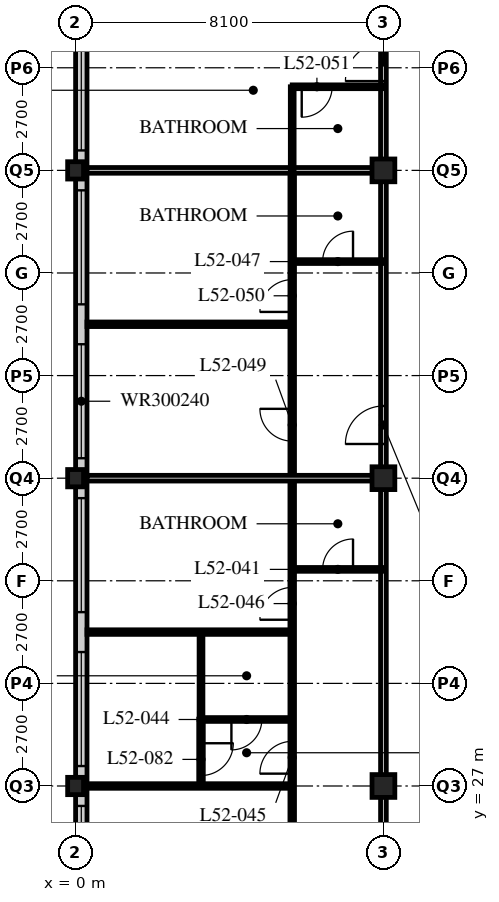
"""IFC4 building model, lengths in metres.
Left out: names, types, materials, properties, quantities, classifications, styles, units other than length and angle.
Written with IfcOpenShell. Run it as: python <this file> out.ifc"""

import sys

from ifc_helpers import new_model, si_unit, direction, frame, frame_2d, origin, origin_2d, place, context, subcontext, project, spatial, rectangle, hollow_rectangle, i_section, extrude, element, fill, save


model = new_model("IFC4")
c1 = context("Model", 3, precision=1e-05, world=origin(), true_north=direction((0.0, 1.0)))
c2 = subcontext(c1, "Body", "Model", "MODEL_VIEW")
j1 = project(units=[si_unit("LENGTHUNIT", "METRE"), si_unit("PLANEANGLEUNIT", "RADIAN")], contexts=[c1])
p1 = place(None, origin())
s1 = spatial("IfcSite", under=j1, at=p1, CompositionType="ELEMENT")
p2 = place(p1, origin())
s2 = spatial("IfcBuilding", under=s1, at=p2, CompositionType="ELEMENT")
p3 = place(p2, frame((0.0, 0.0, 202.8)))
s3 = spatial("IfcBuildingStorey", under=s2, at=p3, CompositionType="ELEMENT", Elevation=202.8)
for number, where, z_axis, x_axis in (
    (1, (0.0, 27.0, 0.0), (0.0, 0.0, 1.0), (1.0, 0.0, 0.0)),
    (2, (0.0, 35.1, 0.0), (0.0, 0.0, 1.0), (1.0, 0.0, 0.0)),
    (3, (0.0, 43.2, 0.0), (0.0, 0.0, 1.0), (1.0, 0.0, 0.0)),
):
    element("IfcColumn", number, at=place(p3, frame(where, z_axis=z_axis, x_axis=x_axis)), inside=s3, PredefinedType="COLUMN", context=c2, shape_type="SweptSolid", body=[
        extrude(i_section(OverallWidth=0.418, OverallDepth=0.456, WebThickness=0.042, FlangeThickness=0.067, FilletRadius=0.015, at=origin_2d()), origin(), (0.0, 0.0, 1.0), 3.6),
    ])
for number, where, z_axis, x_axis in (
    (4, (8.1, 27.0, 0.0), (0.0, 0.0, 1.0), (1.0, 0.0, 0.0)),
    (5, (8.1, 35.1, 0.0), (0.0, 0.0, 1.0), (1.0, 0.0, 0.0)),
    (6, (8.1, 43.2, 0.0), (0.0, 0.0, 1.0), (1.0, 0.0, 0.0)),
):
    element("IfcColumn", number, at=place(p3, frame(where, z_axis=z_axis, x_axis=x_axis)), inside=s3, PredefinedType="COLUMN", context=c2, shape_type="SweptSolid", body=[
        extrude(hollow_rectangle(XDim=0.6, YDim=0.6, WallThickness=0.05, at=origin_2d()), origin(), (0.0, 0.0, 1.0), 3.6),
    ])
p4 = place(p3, frame((0.15, 51.0, 0.0), z_axis=(0.0, 0.0, 1.0), x_axis=(0.0, -1.0, 0.0)))
e7 = element("IfcWall", 7, at=p4, inside=s3, PredefinedType="SOLIDWALL", context=c2, shape_type="SweptSolid", body=[
    extrude(rectangle(XDim=32.1, YDim=0.3, at=frame_2d((16.05, 0.0))), origin(), (0.0, 0.0, 1.0), 3.39),
])
p5 = place(p4, frame((0.225, 0.0, 0.6)))
e8 = element("IfcOpeningElement", 8, at=p5, cuts=e7, PredefinedType="OPENING", context=c2, shape_type="SweptSolid", body=[
    extrude(rectangle(XDim=3.0, YDim=2.4, at=frame_2d((1.5, 1.2))), frame((0.0, 0.16, 0.0), z_axis=(0.0, -1.0, 0.0), x_axis=(1.0, 0.0, 0.0)), (0.0, 0.0, 1.0), 0.32),
])
p6 = place(p4, frame((4.275, 0.0, 0.6)))
e9 = element("IfcOpeningElement", 9, at=p6, cuts=e7, PredefinedType="OPENING", context=c2, shape_type="SweptSolid", body=[
    extrude(rectangle(XDim=3.0, YDim=2.4, at=frame_2d((1.5, 1.2))), frame((0.0, 0.16, 0.0), z_axis=(0.0, -1.0, 0.0), x_axis=(1.0, 0.0, 0.0)), (0.0, 0.0, 1.0), 0.32),
])
p7 = place(p4, frame((8.325, 0.0, 0.6)))
e10 = element("IfcOpeningElement", 10, at=p7, cuts=e7, PredefinedType="OPENING", context=c2, shape_type="SweptSolid", body=[
    extrude(rectangle(XDim=3.0, YDim=2.4, at=frame_2d((1.5, 1.2))), frame((0.0, 0.16, 0.0), z_axis=(0.0, -1.0, 0.0), x_axis=(1.0, 0.0, 0.0)), (0.0, 0.0, 1.0), 0.32),
])
p8 = place(p4, frame((12.375, 0.0, 0.6)))
e11 = element("IfcOpeningElement", 11, at=p8, cuts=e7, PredefinedType="OPENING", context=c2, shape_type="SweptSolid", body=[
    extrude(rectangle(XDim=3.0, YDim=2.4, at=frame_2d((1.5, 1.2))), frame((0.0, 0.16, 0.0), z_axis=(0.0, -1.0, 0.0), x_axis=(1.0, 0.0, 0.0)), (0.0, 0.0, 1.0), 0.32),
])
p9 = place(p4, frame((16.425, 0.0, 0.6)))
e12 = element("IfcOpeningElement", 12, at=p9, cuts=e7, PredefinedType="OPENING", context=c2, shape_type="SweptSolid", body=[
    extrude(rectangle(XDim=3.0, YDim=2.4, at=frame_2d((1.5, 1.2))), frame((0.0, 0.16, 0.0), z_axis=(0.0, -1.0, 0.0), x_axis=(1.0, 0.0, 0.0)), (0.0, 0.0, 1.0), 0.32),
])
p10 = place(p4, frame((20.475, 0.0, 0.6)))
e13 = element("IfcOpeningElement", 13, at=p10, cuts=e7, PredefinedType="OPENING", context=c2, shape_type="SweptSolid", body=[
    extrude(rectangle(XDim=3.0, YDim=2.4, at=frame_2d((1.5, 1.2))), frame((0.0, 0.16, 0.0), z_axis=(0.0, -1.0, 0.0), x_axis=(1.0, 0.0, 0.0)), (0.0, 0.0, 1.0), 0.32),
])
p11 = place(p4, frame((24.525, 0.0, 0.6)))
e14 = element("IfcOpeningElement", 14, at=p11, cuts=e7, PredefinedType="OPENING", context=c2, shape_type="SweptSolid", body=[
    extrude(rectangle(XDim=3.0, YDim=2.4, at=frame_2d((1.5, 1.2))), frame((0.0, 0.16, 0.0), z_axis=(0.0, -1.0, 0.0), x_axis=(1.0, 0.0, 0.0)), (0.0, 0.0, 1.0), 0.32),
])
p12 = place(p4, frame((28.575, 0.0, 0.6)))
e15 = element("IfcOpeningElement", 15, at=p12, cuts=e7, PredefinedType="OPENING", context=c2, shape_type="SweptSolid", body=[
    extrude(rectangle(XDim=3.0, YDim=2.4, at=frame_2d((1.5, 1.2))), frame((0.0, 0.16, 0.0), z_axis=(0.0, -1.0, 0.0), x_axis=(1.0, 0.0, 0.0)), (0.0, 0.0, 1.0), 0.32),
])
p13 = place(p3, frame((8.1, 18.9, 0.0), z_axis=(0.0, 0.0, 1.0), x_axis=(0.0, 1.0, 0.0)))
e16 = element("IfcWall", 16, at=p13, inside=s3, PredefinedType="PARTITIONING", context=c2, shape_type="SweptSolid", body=[
    extrude(rectangle(XDim=28.35, YDim=0.15, at=frame_2d((14.175, 0.0))), origin(), (0.0, 0.0, 1.0), 2.778),
])
p14 = place(p13, frame((0.9, 0.0, 0.0)))
e17 = element("IfcOpeningElement", 17, at=p14, cuts=e16, PredefinedType="OPENING", context=c2, shape_type="SweptSolid", body=[
    extrude(rectangle(XDim=1.0, YDim=2.1, at=frame_2d((0.5, 1.05))), frame((0.0, 0.085, 0.0), z_axis=(0.0, -1.0, 0.0), x_axis=(1.0, 0.0, 0.0)), (0.0, 0.0, 1.0), 0.17),
])
p15 = place(p13, frame((17.1, 0.0, 0.0)))
e18 = element("IfcOpeningElement", 18, at=p15, cuts=e16, PredefinedType="OPENING", context=c2, shape_type="SweptSolid", body=[
    extrude(rectangle(XDim=1.0, YDim=2.1, at=frame_2d((0.5, 1.05))), frame((0.0, 0.085, 0.0), z_axis=(0.0, -1.0, 0.0), x_axis=(1.0, 0.0, 0.0)), (0.0, 0.0, 1.0), 0.17),
])
p16 = place(p13, frame((26.65, 0.0, 0.0)))
e19 = element("IfcOpeningElement", 19, at=p16, cuts=e16, PredefinedType="OPENING", context=c2, shape_type="SweptSolid", body=[
    extrude(rectangle(XDim=1.0, YDim=2.1, at=frame_2d((0.5, 1.05))), frame((0.0, 0.085, 0.0), z_axis=(0.0, -1.0, 0.0), x_axis=(1.0, 0.0, 0.0)), (0.0, 0.0, 1.0), 0.17),
])
p17 = place(p3, frame((5.7, 18.9, 0.0), z_axis=(0.0, 0.0, 1.0), x_axis=(0.0, 1.0, 0.0)))
e20 = element("IfcWall", 20, at=p17, inside=s3, PredefinedType="PARTITIONING", context=c2, shape_type="SweptSolid", body=[
    extrude(rectangle(XDim=24.3, YDim=0.12, at=frame_2d((12.15, 0.0))), origin(), (0.0, 0.0, 1.0), 3.39),
])
p18 = place(p17, frame((0.975, 0.0, 0.0)))
e21 = element("IfcOpeningElement", 21, at=p18, cuts=e20, PredefinedType="OPENING", context=c2, shape_type="SweptSolid", body=[
    extrude(rectangle(XDim=0.85, YDim=2.1, at=frame_2d((0.425, 1.05))), frame((0.0, 0.07, 0.0), z_axis=(0.0, -1.0, 0.0), x_axis=(1.0, 0.0, 0.0)), (0.0, 0.0, 1.0), 0.14),
])
p19 = place(p17, frame((8.425, 0.0, 0.0)))
e22 = element("IfcOpeningElement", 22, at=p19, cuts=e20, PredefinedType="OPENING", context=c2, shape_type="SweptSolid", body=[
    extrude(rectangle(XDim=0.85, YDim=2.1, at=frame_2d((0.425, 1.05))), frame((0.0, 0.07, 0.0), z_axis=(0.0, -1.0, 0.0), x_axis=(1.0, 0.0, 0.0)), (0.0, 0.0, 1.0), 0.14),
])
p20 = place(p17, frame((12.475, 0.0, 0.0)))
e23 = element("IfcOpeningElement", 23, at=p20, cuts=e20, PredefinedType="OPENING", context=c2, shape_type="SweptSolid", body=[
    extrude(rectangle(XDim=0.85, YDim=2.1, at=frame_2d((0.425, 1.05))), frame((0.0, 0.07, 0.0), z_axis=(0.0, -1.0, 0.0), x_axis=(1.0, 0.0, 0.0)), (0.0, 0.0, 1.0), 0.14),
])
p21 = place(p17, frame((17.175, 0.0, 0.0)))
e24 = element("IfcOpeningElement", 24, at=p21, cuts=e20, PredefinedType="OPENING", context=c2, shape_type="SweptSolid", body=[
    extrude(rectangle(XDim=0.85, YDim=2.1, at=frame_2d((0.425, 1.05))), frame((0.0, 0.07, 0.0), z_axis=(0.0, -1.0, 0.0), x_axis=(1.0, 0.0, 0.0)), (0.0, 0.0, 1.0), 0.14),
])
p22 = place(p17, frame((20.575, 0.0, 0.0)))
e25 = element("IfcOpeningElement", 25, at=p22, cuts=e20, PredefinedType="OPENING", context=c2, shape_type="SweptSolid", body=[
    extrude(rectangle(XDim=0.85, YDim=2.1, at=frame_2d((0.425, 1.05))), frame((0.0, 0.07, 0.0), z_axis=(0.0, -1.0, 0.0), x_axis=(1.0, 0.0, 0.0)), (0.0, 0.0, 1.0), 0.14),
])
p23 = place(p3, frame((8.1, 32.7, 0.0), z_axis=(0.0, 0.0, 1.0), x_axis=(-1.0, 0.0, 0.0)))
e26 = element("IfcWall", 26, at=p23, inside=s3, PredefinedType="PARTITIONING", context=c2, shape_type="SweptSolid", body=[
    extrude(rectangle(XDim=2.4, YDim=0.1, at=frame_2d((1.2, 0.0))), origin(), (0.0, 0.0, 1.0), 3.39),
])
p24 = place(p23, frame((0.8, 0.0, 0.0)))
e27 = element("IfcOpeningElement", 27, at=p24, cuts=e26, PredefinedType="OPENING", context=c2, shape_type="SweptSolid", body=[
    extrude(rectangle(XDim=0.8, YDim=2.1, at=frame_2d((0.4, 1.05))), frame((0.0, 0.06, 0.0), z_axis=(0.0, -1.0, 0.0), x_axis=(1.0, 0.0, 0.0)), (0.0, 0.0, 1.0), 0.12),
])
p25 = place(p3, frame((5.7, 28.75, 0.0), z_axis=(0.0, 0.0, 1.0), x_axis=(-1.0, 0.0, 0.0)))
e28 = element("IfcWall", 28, at=p25, inside=s3, PredefinedType="PARTITIONING", context=c2, shape_type="SweptSolid", body=[
    extrude(rectangle(XDim=2.4, YDim=0.1, at=frame_2d((1.2, 0.0))), origin(), (0.0, 0.0, 1.0), 3.39),
])
p26 = place(p25, frame((0.8, 0.0, 0.0)))
e29 = element("IfcOpeningElement", 29, at=p26, cuts=e28, PredefinedType="OPENING", context=c2, shape_type="SweptSolid", body=[
    extrude(rectangle(XDim=0.8, YDim=2.1, at=frame_2d((0.4, 1.05))), frame((0.0, 0.06, 0.0), z_axis=(0.0, -1.0, 0.0), x_axis=(1.0, 0.0, 0.0)), (0.0, 0.0, 1.0), 0.12),
])
p27 = place(p3, frame((3.3, 28.75, 0.0), z_axis=(0.0, 0.0, 1.0), x_axis=(0.0, 1.0, 0.0)))
e30 = element("IfcWall", 30, at=p27, inside=s3, PredefinedType="PARTITIONING", context=c2, shape_type="SweptSolid", body=[
    extrude(rectangle(XDim=2.3, YDim=0.1, at=frame_2d((1.15, 0.0))), origin(), (0.0, 0.0, 1.0), 3.39),
])
p28 = place(p3, frame((5.7, 27.0, 0.0), z_axis=(0.0, 0.0, 1.0), x_axis=(-1.0, 0.0, 0.0)))
e31 = element("IfcWall", 31, at=p28, inside=s3, PredefinedType="PARTITIONING", context=c2, shape_type="SweptSolid", body=[
    extrude(rectangle(XDim=5.4, YDim=0.12, at=frame_2d((2.7, 0.0))), origin(), (0.0, 0.0, 1.0), 2.778),
])
p29 = place(p3, frame((5.7, 31.05, 0.0), z_axis=(0.0, 0.0, 1.0), x_axis=(-1.0, 0.0, 0.0)))
e32 = element("IfcWall", 32, at=p29, inside=s3, PredefinedType="PARTITIONING", context=c2, shape_type="SweptSolid", body=[
    extrude(rectangle(XDim=5.4, YDim=0.12, at=frame_2d((2.7, 0.0))), origin(), (0.0, 0.0, 1.0), 3.39),
])
p30 = place(p3, frame((8.1, 35.1, 0.0), z_axis=(0.0, 0.0, 1.0), x_axis=(-1.0, 0.0, 0.0)))
e33 = element("IfcWall", 33, at=p30, inside=s3, PredefinedType="PARTITIONING", context=c2, shape_type="SweptSolid", body=[
    extrude(rectangle(XDim=7.8, YDim=0.15, at=frame_2d((3.9, 0.0))), origin(), (0.0, 0.0, 1.0), 2.778),
])
p31 = place(p3, frame((8.1, 40.8, 0.0), z_axis=(0.0, 0.0, 1.0), x_axis=(-1.0, 0.0, 0.0)))
e34 = element("IfcWall", 34, at=p31, inside=s3, PredefinedType="PARTITIONING", context=c2, shape_type="SweptSolid", body=[
    extrude(rectangle(XDim=2.4, YDim=0.1, at=frame_2d((1.2, 0.0))), origin(), (0.0, 0.0, 1.0), 3.39),
])
p32 = place(p31, frame((0.8, 0.0, 0.0)))
e35 = element("IfcOpeningElement", 35, at=p32, cuts=e34, PredefinedType="OPENING", context=c2, shape_type="SweptSolid", body=[
    extrude(rectangle(XDim=0.8, YDim=2.1, at=frame_2d((0.4, 1.05))), frame((0.0, 0.06, 0.0), z_axis=(0.0, -1.0, 0.0), x_axis=(1.0, 0.0, 0.0)), (0.0, 0.0, 1.0), 0.12),
])
p33 = place(p3, frame((5.7, 39.15, 0.0), z_axis=(0.0, 0.0, 1.0), x_axis=(-1.0, 0.0, 0.0)))
e36 = element("IfcWall", 36, at=p33, inside=s3, PredefinedType="PARTITIONING", context=c2, shape_type="SweptSolid", body=[
    extrude(rectangle(XDim=5.4, YDim=0.12, at=frame_2d((2.7, 0.0))), origin(), (0.0, 0.0, 1.0), 3.39),
])
p34 = place(p3, frame((8.1, 43.2, 0.0), z_axis=(0.0, 0.0, 1.0), x_axis=(-1.0, 0.0, 0.0)))
e37 = element("IfcWall", 37, at=p34, inside=s3, PredefinedType="PARTITIONING", context=c2, shape_type="SweptSolid", body=[
    extrude(rectangle(XDim=7.8, YDim=0.15, at=frame_2d((3.9, 0.0))), origin(), (0.0, 0.0, 1.0), 2.778),
])
p35 = place(p3, frame((5.7, 43.2, 0.0), z_axis=(0.0, 0.0, 1.0), x_axis=(0.0, 1.0, 0.0)))
e38 = element("IfcWall", 38, at=p35, inside=s3, PredefinedType="PARTITIONING", context=c2, shape_type="SweptSolid", body=[
    extrude(rectangle(XDim=2.2, YDim=0.1, at=frame_2d((1.1, 0.0))), origin(), (0.0, 0.0, 1.0), 3.39),
])
p36 = place(p3, frame((8.1, 45.4, 0.0), z_axis=(0.0, 0.0, 1.0), x_axis=(-1.0, 0.0, 0.0)))
e39 = element("IfcWall", 39, at=p36, inside=s3, PredefinedType="PARTITIONING", context=c2, shape_type="SweptSolid", body=[
    extrude(rectangle(XDim=2.4, YDim=0.1, at=frame_2d((1.2, 0.0))), origin(), (0.0, 0.0, 1.0), 3.39),
])
p37 = place(p36, frame((1.35, 0.0, 0.0)))
e40 = element("IfcOpeningElement", 40, at=p37, cuts=e39, PredefinedType="OPENING", context=c2, shape_type="SweptSolid", body=[
    extrude(rectangle(XDim=0.8, YDim=2.1, at=frame_2d((0.4, 1.05))), frame((0.0, 0.06, 0.0), z_axis=(0.0, -1.0, 0.0), x_axis=(1.0, 0.0, 0.0)), (0.0, 0.0, 1.0), 0.12),
])
p38 = place(p3, frame((3.3, 27.0, 0.0), z_axis=(0.0, 0.0, 1.0), x_axis=(0.0, 1.0, 0.0)))
e41 = element("IfcWall", 41, at=p38, inside=s3, PredefinedType="PARTITIONING", context=c2, shape_type="SweptSolid", body=[
    extrude(rectangle(XDim=1.76, YDim=0.12, at=frame_2d((0.88, 0.0))), origin(), (0.0, 0.0, 1.0), 3.39),
])
p39 = place(p38, frame((0.275, 0.0, 0.0)))
e42 = element("IfcOpeningElement", 42, at=p39, cuts=e41, PredefinedType="OPENING", context=c2, shape_type="SweptSolid", body=[
    extrude(rectangle(XDim=0.85, YDim=2.1, at=frame_2d((0.425, 1.05))), frame((0.0, 0.07, 0.0), z_axis=(0.0, -1.0, 0.0), x_axis=(1.0, 0.0, 0.0)), (0.0, 0.0, 1.0), 0.14),
])
p40 = place(p6, origin())
e43 = element("IfcWindow", 43, at=p40, inside=s3, PartitioningType="SINGLE_PANEL", PredefinedType="WINDOW", context=c2, shape_type="SweptSolid", body=[
    extrude(rectangle(XDim=3.0, YDim=2.4, at=frame_2d((1.5, 1.2))), frame((0.0, 0.03, 0.0), z_axis=(0.0, -1.0, 0.0), x_axis=(1.0, 0.0, 0.0)), (0.0, 0.0, 1.0), 0.06),
])
fill(e9, e43)
p41 = place(p7, origin())
e44 = element("IfcWindow", 44, at=p41, inside=s3, PartitioningType="SINGLE_PANEL", PredefinedType="WINDOW", context=c2, shape_type="SweptSolid", body=[
    extrude(rectangle(XDim=3.0, YDim=2.4, at=frame_2d((1.5, 1.2))), frame((0.0, 0.03, 0.0), z_axis=(0.0, -1.0, 0.0), x_axis=(1.0, 0.0, 0.0)), (0.0, 0.0, 1.0), 0.06),
])
fill(e10, e44)
p42 = place(p8, origin())
e45 = element("IfcWindow", 45, at=p42, inside=s3, PartitioningType="SINGLE_PANEL", PredefinedType="WINDOW", context=c2, shape_type="SweptSolid", body=[
    extrude(rectangle(XDim=3.0, YDim=2.4, at=frame_2d((1.5, 1.2))), frame((0.0, 0.03, 0.0), z_axis=(0.0, -1.0, 0.0), x_axis=(1.0, 0.0, 0.0)), (0.0, 0.0, 1.0), 0.06),
])
fill(e11, e45)
p43 = place(p9, origin())
e46 = element("IfcWindow", 46, at=p43, inside=s3, PartitioningType="SINGLE_PANEL", PredefinedType="WINDOW", context=c2, shape_type="SweptSolid", body=[
    extrude(rectangle(XDim=3.0, YDim=2.4, at=frame_2d((1.5, 1.2))), frame((0.0, 0.03, 0.0), z_axis=(0.0, -1.0, 0.0), x_axis=(1.0, 0.0, 0.0)), (0.0, 0.0, 1.0), 0.06),
])
fill(e12, e46)
p44 = place(p10, origin())
e47 = element("IfcWindow", 47, at=p44, inside=s3, PartitioningType="SINGLE_PANEL", PredefinedType="WINDOW", context=c2, shape_type="SweptSolid", body=[
    extrude(rectangle(XDim=3.0, YDim=2.4, at=frame_2d((1.5, 1.2))), frame((0.0, 0.03, 0.0), z_axis=(0.0, -1.0, 0.0), x_axis=(1.0, 0.0, 0.0)), (0.0, 0.0, 1.0), 0.06),
])
fill(e13, e47)
p45 = place(p11, origin())
e48 = element("IfcWindow", 48, at=p45, inside=s3, PartitioningType="SINGLE_PANEL", PredefinedType="WINDOW", context=c2, shape_type="SweptSolid", body=[
    extrude(rectangle(XDim=3.0, YDim=2.4, at=frame_2d((1.5, 1.2))), frame((0.0, 0.03, 0.0), z_axis=(0.0, -1.0, 0.0), x_axis=(1.0, 0.0, 0.0)), (0.0, 0.0, 1.0), 0.06),
])
fill(e14, e48)
p46 = place(p24, origin())
e49 = element("IfcDoor", 49, at=p46, inside=s3, OperationType="SINGLE_SWING_RIGHT", PredefinedType="DOOR", context=c2, shape_type="SweptSolid", body=[
    extrude(rectangle(XDim=0.8, YDim=2.1, at=frame_2d((0.4, 1.05))), frame((0.0, 0.025, 0.0), z_axis=(0.0, -1.0, 0.0), x_axis=(1.0, 0.0, 0.0)), (0.0, 0.0, 1.0), 0.05),
])
fill(e27, e49)
p47 = place(p26, origin())
e50 = element("IfcDoor", 50, at=p47, inside=s3, OperationType="SINGLE_SWING_RIGHT", PredefinedType="DOOR", context=c2, shape_type="SweptSolid", body=[
    extrude(rectangle(XDim=0.8, YDim=2.1, at=frame_2d((0.4, 1.05))), frame((0.0, 0.025, 0.0), z_axis=(0.0, -1.0, 0.0), x_axis=(1.0, 0.0, 0.0)), (0.0, 0.0, 1.0), 0.05),
])
fill(e29, e50)
p48 = place(p19, origin())
e51 = element("IfcDoor", 51, at=p48, inside=s3, OperationType="SINGLE_SWING_LEFT", PredefinedType="DOOR", context=c2, shape_type="SweptSolid", body=[
    extrude(rectangle(XDim=0.85, YDim=2.1, at=frame_2d((0.425, 1.05))), frame((0.0, 0.025, 0.0), z_axis=(0.0, -1.0, 0.0), x_axis=(1.0, 0.0, 0.0)), (0.0, 0.0, 1.0), 0.05),
])
fill(e22, e51)
p49 = place(p20, origin())
e52 = element("IfcDoor", 52, at=p49, inside=s3, OperationType="SINGLE_SWING_LEFT", PredefinedType="DOOR", context=c2, shape_type="SweptSolid", body=[
    extrude(rectangle(XDim=0.85, YDim=2.1, at=frame_2d((0.425, 1.05))), frame((0.0, 0.025, 0.0), z_axis=(0.0, -1.0, 0.0), x_axis=(1.0, 0.0, 0.0)), (0.0, 0.0, 1.0), 0.05),
])
fill(e23, e52)
p50 = place(p32, origin())
e53 = element("IfcDoor", 53, at=p50, inside=s3, OperationType="SINGLE_SWING_RIGHT", PredefinedType="DOOR", context=c2, shape_type="SweptSolid", body=[
    extrude(rectangle(XDim=0.8, YDim=2.1, at=frame_2d((0.4, 1.05))), frame((0.0, 0.025, 0.0), z_axis=(0.0, -1.0, 0.0), x_axis=(1.0, 0.0, 0.0)), (0.0, 0.0, 1.0), 0.05),
])
fill(e35, e53)
p51 = place(p15, origin())
e54 = element("IfcDoor", 54, at=p51, inside=s3, OperationType="SINGLE_SWING_LEFT", PredefinedType="DOOR", context=c2, shape_type="SweptSolid", body=[
    extrude(rectangle(XDim=1.0, YDim=2.1, at=frame_2d((0.5, 1.05))), frame((0.0, 0.025, 0.0), z_axis=(0.0, -1.0, 0.0), x_axis=(1.0, 0.0, 0.0)), (0.0, 0.0, 1.0), 0.05),
])
fill(e18, e54)
p52 = place(p21, origin())
e55 = element("IfcDoor", 55, at=p52, inside=s3, OperationType="SINGLE_SWING_RIGHT", PredefinedType="DOOR", context=c2, shape_type="SweptSolid", body=[
    extrude(rectangle(XDim=0.85, YDim=2.1, at=frame_2d((0.425, 1.05))), frame((0.0, 0.025, 0.0), z_axis=(0.0, -1.0, 0.0), x_axis=(1.0, 0.0, 0.0)), (0.0, 0.0, 1.0), 0.05),
])
fill(e24, e55)
p53 = place(p22, origin())
e56 = element("IfcDoor", 56, at=p53, inside=s3, OperationType="SINGLE_SWING_LEFT", PredefinedType="DOOR", context=c2, shape_type="SweptSolid", body=[
    extrude(rectangle(XDim=0.85, YDim=2.1, at=frame_2d((0.425, 1.05))), frame((0.0, 0.025, 0.0), z_axis=(0.0, -1.0, 0.0), x_axis=(1.0, 0.0, 0.0)), (0.0, 0.0, 1.0), 0.05),
])
fill(e25, e56)
p54 = place(p37, origin())
e57 = element("IfcDoor", 57, at=p54, inside=s3, OperationType="SINGLE_SWING_RIGHT", PredefinedType="DOOR", context=c2, shape_type="SweptSolid", body=[
    extrude(rectangle(XDim=0.8, YDim=2.1, at=frame_2d((0.4, 1.05))), frame((0.0, 0.025, 0.0), z_axis=(0.0, -1.0, 0.0), x_axis=(1.0, 0.0, 0.0)), (0.0, 0.0, 1.0), 0.05),
])
fill(e40, e57)
p55 = place(p16, origin())
e58 = element("IfcDoor", 58, at=p55, inside=s3, OperationType="SINGLE_SWING_LEFT", PredefinedType="DOOR", context=c2, shape_type="SweptSolid", body=[
    extrude(rectangle(XDim=1.0, YDim=2.1, at=frame_2d((0.5, 1.05))), frame((0.0, 0.025, 0.0), z_axis=(0.0, -1.0, 0.0), x_axis=(1.0, 0.0, 0.0)), (0.0, 0.0, 1.0), 0.05),
])
fill(e19, e58)
p56 = place(p39, origin())
e59 = element("IfcDoor", 59, at=p56, inside=s3, OperationType="SINGLE_SWING_LEFT", PredefinedType="DOOR", context=c2, shape_type="SweptSolid", body=[
    extrude(rectangle(XDim=0.85, YDim=2.1, at=frame_2d((0.425, 1.05))), frame((0.0, 0.025, 0.0), z_axis=(0.0, -1.0, 0.0), x_axis=(1.0, 0.0, 0.0)), (0.0, 0.0, 1.0), 0.05),
])
fill(e42, e59)
save(model, sys.argv[1])
